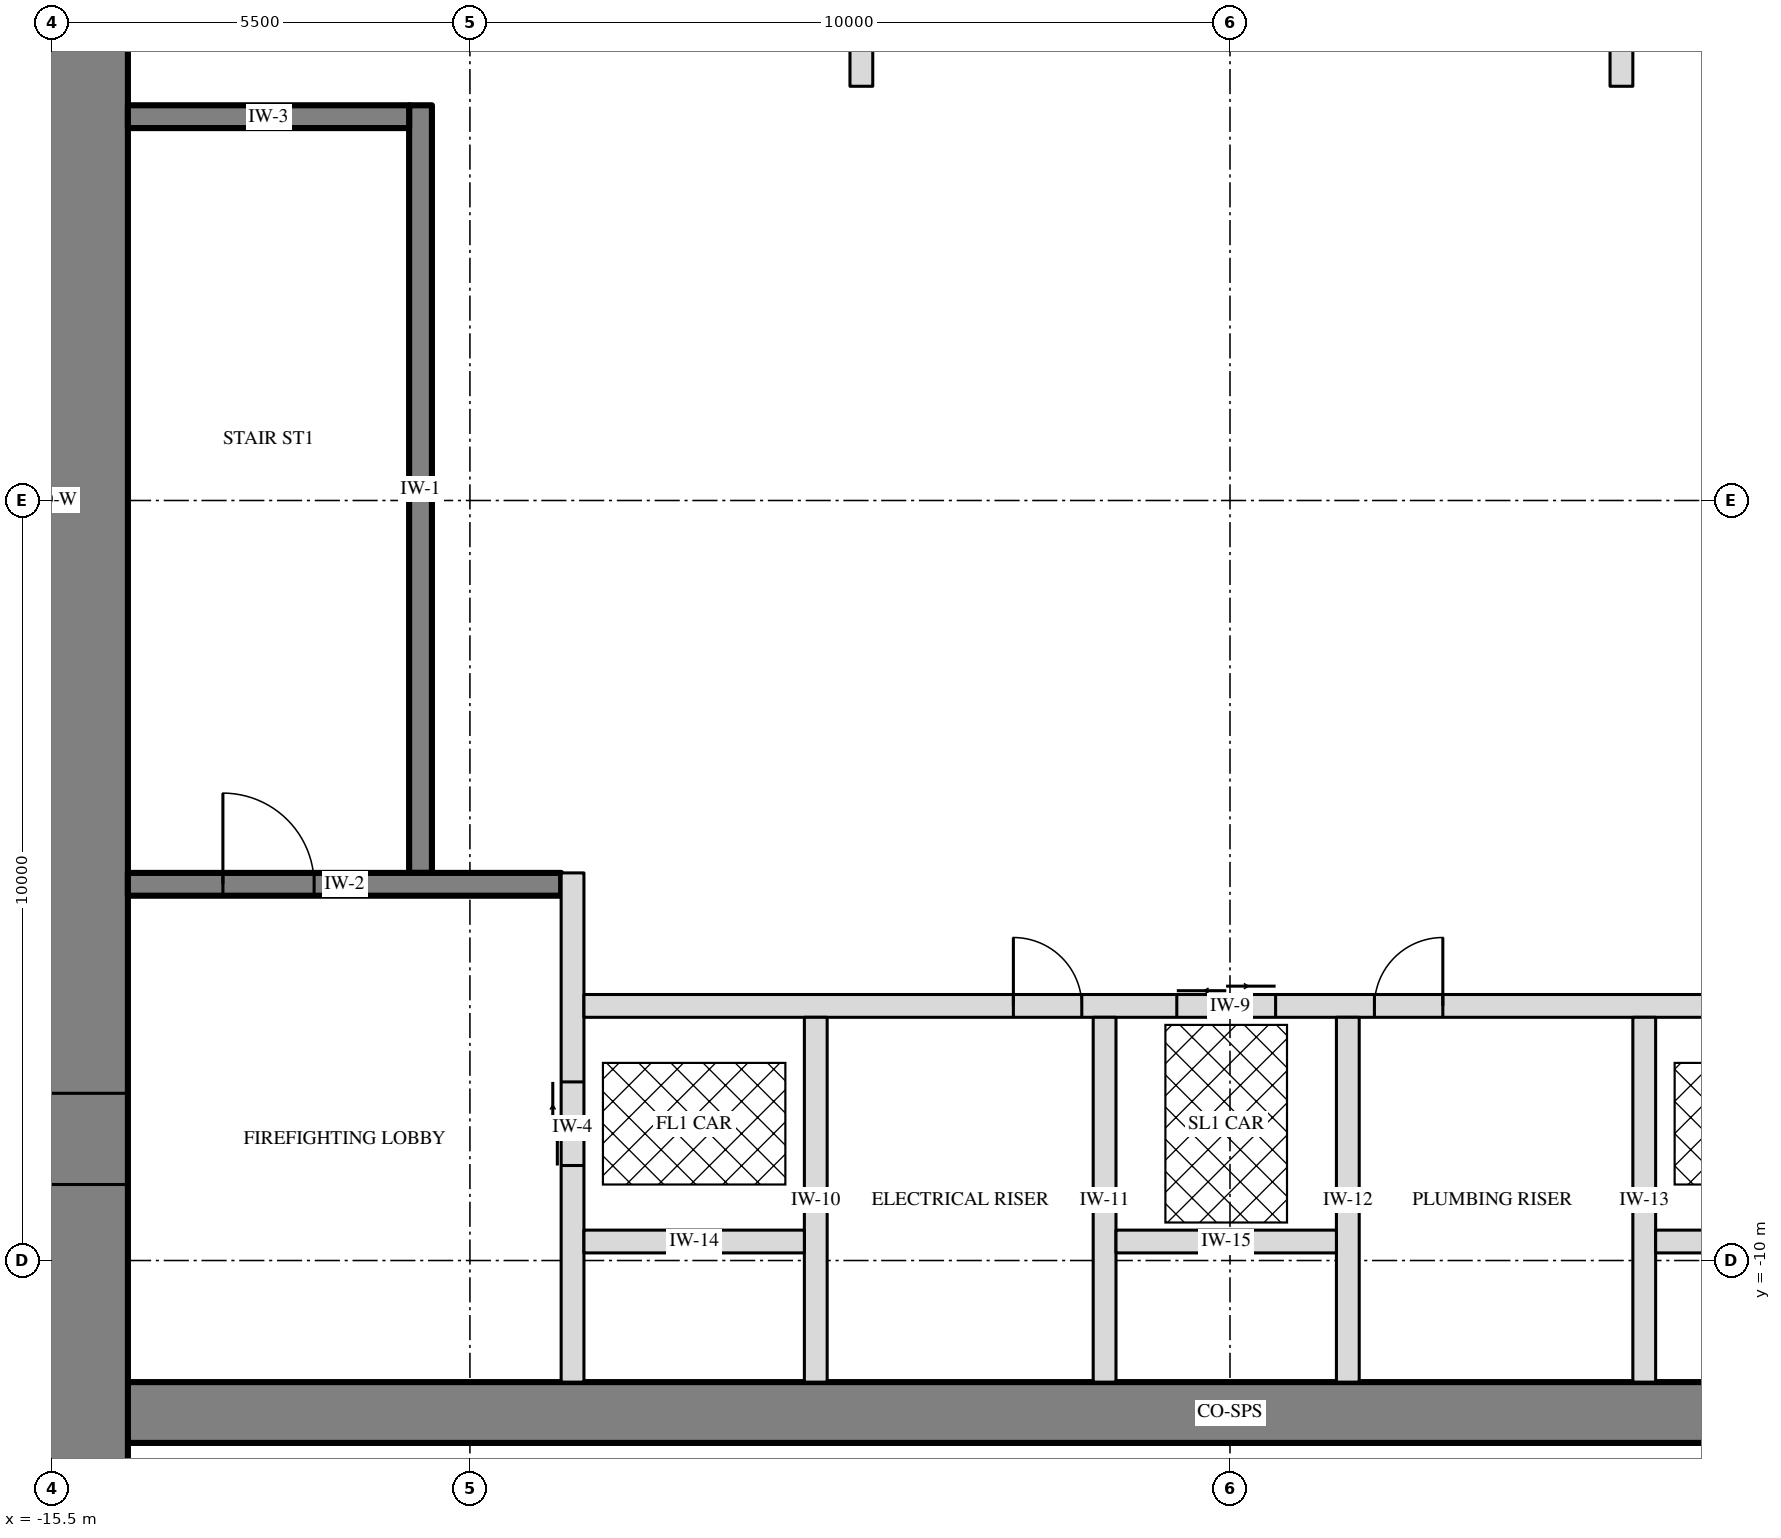
"""IFC4 building model, lengths in metres.
Left out: names, types, materials, properties, quantities, classifications, styles, units other than length and angle.
Written with IfcOpenShell. Run it as: python <this file> out.ifc"""

import sys

from ifc_helpers import new_model, si_unit, direction, frame, frame_2d, origin, origin_2d, place, context, subcontext, project, spatial, rectangle, extrude, element, fill, save


model = new_model("IFC4")
c1 = context("Model", 3, precision=1e-05, world=origin(), true_north=direction((0.0, 1.0)))
c2 = subcontext(c1, "Body", "Model", "MODEL_VIEW")
j1 = project(units=[si_unit("LENGTHUNIT", "METRE"), si_unit("PLANEANGLEUNIT", "RADIAN")], contexts=[c1])
p1 = place(None, origin())
s1 = spatial("IfcSite", under=j1, at=p1, CompositionType="ELEMENT")
p2 = place(p1, origin())
s2 = spatial("IfcBuilding", under=s1, at=p2, CompositionType="ELEMENT")
p3 = place(p2, frame((0.0, 0.0, -13.2)))
s3 = spatial("IfcBuildingStorey", under=s2, at=p3, CompositionType="ELEMENT", Elevation=-13.2)
p4 = place(p3, frame((-15.5, -12.0, -0.4), z_axis=(0.0, 0.0, 1.0), x_axis=(1.0, 0.0, 0.0)))
e1 = element("IfcWall", 1, at=p4, inside=s3, PredefinedType="SHEAR", context=c2, shape_type="SweptSolid", body=[
    extrude(rectangle(XDim=31.0, YDim=0.8, at=frame_2d((15.5, 0.0))), origin(), (0.0, 0.0, 1.0), 4.3),
])
p5 = place(p3, frame((-15.5, -15.5, -0.4), z_axis=(0.0, 0.0, 1.0), x_axis=(0.0, 1.0, 0.0)))
e2 = element("IfcWall", 2, at=p5, inside=s3, PredefinedType="SHEAR", context=c2, shape_type="SweptSolid", body=[
    extrude(rectangle(XDim=31.0, YDim=2.0, at=frame_2d((15.5, 0.0))), origin(), (0.0, 0.0, 1.0), 4.3),
])
p6 = place(p5, frame((6.5, 0.0, 0.4)))
e3 = element("IfcOpeningElement", 3, at=p6, cuts=e2, PredefinedType="OPENING", context=c2, shape_type="SweptSolid", body=[
    extrude(rectangle(XDim=1.2, YDim=2.1, at=frame_2d((0.6, 1.05))), frame((0.0, 1.01, 0.0), z_axis=(0.0, -1.0, 0.0), x_axis=(1.0, 0.0, 0.0)), (0.0, 0.0, 1.0), 2.02),
])
p7 = place(p5, frame((23.0, 0.0, 0.4)))
e4 = element("IfcOpeningElement", 4, at=p7, cuts=e2, PredefinedType="OPENING", context=c2, shape_type="SweptSolid", body=[
    extrude(rectangle(XDim=1.8, YDim=2.1, at=frame_2d((0.9, 1.05))), frame((0.0, 1.01, 0.0), z_axis=(0.0, -1.0, 0.0), x_axis=(1.0, 0.0, 0.0)), (0.0, 0.0, 1.0), 2.02),
])
p8 = place(p3, frame((-10.65, -4.9, 0.0), z_axis=(0.0, 0.0, 1.0), x_axis=(0.0, 1.0, 0.0)))
e5 = element("IfcWall", 5, at=p8, inside=s3, PredefinedType="SOLIDWALL", context=c2, shape_type="SweptSolid", body=[
    extrude(rectangle(XDim=10.1, YDim=0.3, at=frame_2d((5.05, 0.0))), origin(), (0.0, 0.0, 1.0), 3.9),
])
p9 = place(p3, frame((-14.5, -5.05, 0.0), z_axis=(0.0, 0.0, 1.0), x_axis=(1.0, 0.0, 0.0)))
e6 = element("IfcWall", 6, at=p9, inside=s3, PredefinedType="SOLIDWALL", context=c2, shape_type="SweptSolid", body=[
    extrude(rectangle(XDim=5.7, YDim=0.3, at=frame_2d((2.85, 0.0))), origin(), (0.0, 0.0, 1.0), 3.9),
])
p10 = place(p9, frame((1.25, 0.0, 0.0)))
e7 = element("IfcOpeningElement", 7, at=p10, cuts=e6, PredefinedType="OPENING", context=c2, shape_type="SweptSolid", body=[
    extrude(rectangle(XDim=1.2, YDim=2.1, at=frame_2d((0.6, 1.05))), frame((0.0, 0.16, 0.0), z_axis=(0.0, -1.0, 0.0), x_axis=(1.0, 0.0, 0.0)), (0.0, 0.0, 1.0), 0.32),
])
p11 = place(p3, frame((-14.5, 5.05, 0.0), z_axis=(0.0, 0.0, 1.0), x_axis=(1.0, 0.0, 0.0)))
e8 = element("IfcWall", 8, at=p11, inside=s3, PredefinedType="SOLIDWALL", context=c2, shape_type="SweptSolid", body=[
    extrude(rectangle(XDim=3.7, YDim=0.3, at=frame_2d((1.85, 0.0))), origin(), (0.0, 0.0, 1.0), 3.9),
])
p12 = place(p3, frame((-8.65, -11.6, 0.0), z_axis=(0.0, 0.0, 1.0), x_axis=(0.0, 1.0, 0.0)))
e9 = element("IfcWall", 9, at=p12, inside=s3, PredefinedType="PARTITIONING", context=c2, shape_type="SweptSolid", body=[
    extrude(rectangle(XDim=6.7, YDim=0.3, at=frame_2d((3.35, 0.0))), origin(), (0.0, 0.0, 1.0), 3.9),
])
p13 = place(p12, frame((2.85, 0.0, 0.0)))
e10 = element("IfcOpeningElement", 10, at=p13, cuts=e9, PredefinedType="OPENING", context=c2, shape_type="SweptSolid", body=[
    extrude(rectangle(XDim=1.1, YDim=2.1, at=frame_2d((0.55, 1.05))), frame((0.0, 0.16, 0.0), z_axis=(0.0, -1.0, 0.0), x_axis=(1.0, 0.0, 0.0)), (0.0, 0.0, 1.0), 0.32),
])
p14 = place(p3, frame((-8.5, -6.65, 0.0), z_axis=(0.0, 0.0, 1.0), x_axis=(1.0, 0.0, 0.0)))
e11 = element("IfcWall", 11, at=p14, inside=s3, PredefinedType="PARTITIONING", context=c2, shape_type="SweptSolid", body=[
    extrude(rectangle(XDim=17.0, YDim=0.3, at=frame_2d((8.5, 0.0))), origin(), (0.0, 0.0, 1.0), 3.9),
])
p15 = place(p14, frame((7.8, 0.0, 0.0)))
e12 = element("IfcOpeningElement", 12, at=p15, cuts=e11, PredefinedType="OPENING", context=c2, shape_type="SweptSolid", body=[
    extrude(rectangle(XDim=1.3, YDim=2.4, at=frame_2d((0.65, 1.2))), frame((0.0, 0.16, 0.0), z_axis=(0.0, -1.0, 0.0), x_axis=(1.0, 0.0, 0.0)), (0.0, 0.0, 1.0), 0.32),
])
p16 = place(p14, frame((5.65, 0.0, 0.0)))
e13 = element("IfcOpeningElement", 13, at=p16, cuts=e11, PredefinedType="OPENING", context=c2, shape_type="SweptSolid", body=[
    extrude(rectangle(XDim=0.9, YDim=2.1, at=frame_2d((0.45, 1.05))), frame((0.0, 0.16, 0.0), z_axis=(0.0, -1.0, 0.0), x_axis=(1.0, 0.0, 0.0)), (0.0, 0.0, 1.0), 0.32),
])
p17 = place(p14, frame((10.4, 0.0, 0.0)))
e14 = element("IfcOpeningElement", 14, at=p17, cuts=e11, PredefinedType="OPENING", context=c2, shape_type="SweptSolid", body=[
    extrude(rectangle(XDim=0.9, YDim=2.1, at=frame_2d((0.45, 1.05))), frame((0.0, 0.16, 0.0), z_axis=(0.0, -1.0, 0.0), x_axis=(1.0, 0.0, 0.0)), (0.0, 0.0, 1.0), 0.32),
])
for number, where, z_axis, x_axis in (
    (15, (-5.45, -11.6, 0.0), (0.0, 0.0, 1.0), (0.0, 1.0, 0.0)),
    (16, (-1.65, -11.6, 0.0), (0.0, 0.0, 1.0), (0.0, 1.0, 0.0)),
    (17, (1.55, -11.6, 0.0), (0.0, 0.0, 1.0), (0.0, 1.0, 0.0)),
    (18, (5.45, -11.6, 0.0), (0.0, 0.0, 1.0), (0.0, 1.0, 0.0)),
):
    element("IfcWall", number, at=place(p3, frame(where, z_axis=z_axis, x_axis=x_axis)), inside=s3, PredefinedType="PARTITIONING", context=c2, shape_type="SweptSolid", body=[
        extrude(rectangle(XDim=4.8, YDim=0.3, at=frame_2d((2.4, 0.0))), origin(), (0.0, 0.0, 1.0), 3.9),
    ])
for number, where, z_axis, x_axis in (
    (19, (-8.5, -9.75, 0.0), (0.0, 0.0, 1.0), (1.0, 0.0, 0.0)),
    (20, (-1.5, -9.75, 0.0), (0.0, 0.0, 1.0), (1.0, 0.0, 0.0)),
    (21, (5.6, -9.75, 0.0), (0.0, 0.0, 1.0), (1.0, 0.0, 0.0)),
):
    element("IfcWall", number, at=place(p3, frame(where, z_axis=z_axis, x_axis=x_axis)), inside=s3, PredefinedType="PARTITIONING", context=c2, shape_type="SweptSolid", body=[
        extrude(rectangle(XDim=2.9, YDim=0.3, at=frame_2d((1.45, 0.0))), origin(), (0.0, 0.0, 1.0), 3.9),
    ])
p18 = place(p3, frame((-10.65, 2.0, 0.0), z_axis=(0.0, 0.0, 1.0), x_axis=(1.0, 0.0, 0.0)))
e22 = element("IfcWall", 22, at=p18, inside=s3, PredefinedType="PARTITIONING", context=c2, shape_type="SweptSolid", body=[
    extrude(rectangle(XDim=21.3, YDim=0.3, at=frame_2d((10.65, 0.0))), origin(), (0.0, 0.0, 1.0), 3.9),
])
p19 = place(p18, frame((10.05, 0.0, 0.0)))
e23 = element("IfcOpeningElement", 23, at=p19, cuts=e22, PredefinedType="OPENING", context=c2, shape_type="SweptSolid", body=[
    extrude(rectangle(XDim=1.2, YDim=2.1, at=frame_2d((0.6, 1.05))), frame((0.0, 0.16, 0.0), z_axis=(0.0, -1.0, 0.0), x_axis=(1.0, 0.0, 0.0)), (0.0, 0.0, 1.0), 0.32),
])
p20 = place(p18, frame((18.942, 0.0, 0.0)))
e24 = element("IfcOpeningElement", 24, at=p20, cuts=e22, PredefinedType="OPENING", context=c2, shape_type="SweptSolid", body=[
    extrude(rectangle(XDim=0.9, YDim=2.1, at=frame_2d((0.45, 1.05))), frame((0.0, 0.16, 0.0), z_axis=(0.0, -1.0, 0.0), x_axis=(1.0, 0.0, 0.0)), (0.0, 0.0, 1.0), 0.32),
])
p21 = place(p3, frame((-3.3, -6.65, 0.0), z_axis=(0.0, 0.0, 1.0), x_axis=(0.0, 1.0, 0.0)))
e25 = element("IfcWall", 25, at=p21, inside=s3, PredefinedType="PARTITIONING", context=c2, shape_type="SweptSolid", body=[
    extrude(rectangle(XDim=8.65, YDim=0.3, at=frame_2d((4.325, 0.0))), origin(), (0.0, 0.0, 1.0), 3.9),
])
p22 = place(p21, frame((1.75, 0.0, 0.0)))
e26 = element("IfcOpeningElement", 26, at=p22, cuts=e25, PredefinedType="OPENING", context=c2, shape_type="SweptSolid", body=[
    extrude(rectangle(XDim=0.9, YDim=2.1, at=frame_2d((0.45, 1.05))), frame((0.0, 0.16, 0.0), z_axis=(0.0, -1.0, 0.0), x_axis=(1.0, 0.0, 0.0)), (0.0, 0.0, 1.0), 0.32),
])
p23 = place(p21, frame((6.075, 0.0, 0.0)))
e27 = element("IfcOpeningElement", 27, at=p23, cuts=e25, PredefinedType="OPENING", context=c2, shape_type="SweptSolid", body=[
    extrude(rectangle(XDim=0.9, YDim=2.1, at=frame_2d((0.45, 1.05))), frame((0.0, 0.16, 0.0), z_axis=(0.0, -1.0, 0.0), x_axis=(1.0, 0.0, 0.0)), (0.0, 0.0, 1.0), 0.32),
])
p24 = place(p3, frame((3.3, -6.65, 0.0), z_axis=(0.0, 0.0, 1.0), x_axis=(0.0, 1.0, 0.0)))
e28 = element("IfcWall", 28, at=p24, inside=s3, PredefinedType="PARTITIONING", context=c2, shape_type="SweptSolid", body=[
    extrude(rectangle(XDim=8.65, YDim=0.3, at=frame_2d((4.325, 0.0))), origin(), (0.0, 0.0, 1.0), 3.9),
])
p25 = place(p24, frame((3.875, 0.0, 0.0)))
e29 = element("IfcOpeningElement", 29, at=p25, cuts=e28, PredefinedType="OPENING", context=c2, shape_type="SweptSolid", body=[
    extrude(rectangle(XDim=0.9, YDim=2.1, at=frame_2d((0.45, 1.05))), frame((0.0, 0.16, 0.0), z_axis=(0.0, -1.0, 0.0), x_axis=(1.0, 0.0, 0.0)), (0.0, 0.0, 1.0), 0.32),
])
p26 = place(p3, frame((-10.65, -2.25, 0.0), z_axis=(0.0, 0.0, 1.0), x_axis=(1.0, 0.0, 0.0)))
e30 = element("IfcWall", 30, at=p26, inside=s3, PredefinedType="PARTITIONING", context=c2, shape_type="SweptSolid", body=[
    extrude(rectangle(XDim=7.35, YDim=0.3, at=frame_2d((3.675, 0.0))), origin(), (0.0, 0.0, 1.0), 3.9),
])
p27 = place(p3, frame((-4.85, 5.45, 0.0), z_axis=(0.0, 0.0, 1.0), x_axis=(1.0, 0.0, 0.0)))
e31 = element("IfcWall", 31, at=p27, inside=s3, PredefinedType="PARTITIONING", context=c2, shape_type="SweptSolid", body=[
    extrude(rectangle(XDim=10.0, YDim=0.3, at=frame_2d((5.0, 0.0))), origin(), (0.0, 0.0, 1.0), 3.9),
])
p28 = place(p3, frame((-4.85, 5.45, 0.0), z_axis=(0.0, 0.0, 1.0), x_axis=(0.0, 1.0, 0.0)))
e32 = element("IfcWall", 32, at=p28, inside=s3, PredefinedType="PARTITIONING", context=c2, shape_type="SweptSolid", body=[
    extrude(rectangle(XDim=6.15, YDim=0.3, at=frame_2d((3.075, 0.0))), origin(), (0.0, 0.0, 1.0), 3.9),
])
p29 = place(p3, frame((5.15, 5.45, 0.0), z_axis=(0.0, 0.0, 1.0), x_axis=(0.0, 1.0, 0.0)))
e33 = element("IfcWall", 33, at=p29, inside=s3, PredefinedType="PARTITIONING", context=c2, shape_type="SweptSolid", body=[
    extrude(rectangle(XDim=6.15, YDim=0.3, at=frame_2d((3.075, 0.0))), origin(), (0.0, 0.0, 1.0), 3.9),
])
p30 = place(p29, frame((1.1, 0.0, 0.0)))
e34 = element("IfcOpeningElement", 34, at=p30, cuts=e33, PredefinedType="OPENING", context=c2, shape_type="SweptSolid", body=[
    extrude(rectangle(XDim=0.9, YDim=2.1, at=frame_2d((0.45, 1.05))), frame((0.0, 0.16, 0.0), z_axis=(0.0, -1.0, 0.0), x_axis=(1.0, 0.0, 0.0)), (0.0, 0.0, 1.0), 0.32),
])
for number, where, z_axis, x_axis in (
    (35, (-8.5, -9.55, -1.8), (0.0, 0.0, 1.0), (1.0, 0.0, 0.0)),
    (36, (-5.6, -6.85, -1.8), (0.0, 0.0, 1.0), (-1.0, 0.0, 0.0)),
):
    element("IfcWall", number, at=place(p3, frame(where, z_axis=z_axis, x_axis=x_axis)), inside=s3, PredefinedType="SOLIDWALL", context=c2, shape_type="SweptSolid", body=[
        extrude(rectangle(XDim=2.9, YDim=0.1, at=frame_2d((1.45, 0.0))), origin(), (0.0, 0.0, 1.0), 1.8),
    ])
for number, where, z_axis, x_axis in (
    (37, (-8.45, -6.9, -1.8), (0.0, 0.0, 1.0), (0.0, -1.0, 0.0)),
    (38, (-5.65, -9.5, -1.8), (0.0, 0.0, 1.0), (0.0, 1.0, 0.0)),
):
    element("IfcWall", number, at=place(p3, frame(where, z_axis=z_axis, x_axis=x_axis)), inside=s3, PredefinedType="SOLIDWALL", context=c2, shape_type="SweptSolid", body=[
        extrude(rectangle(XDim=2.6, YDim=0.1, at=frame_2d((1.3, 0.0))), origin(), (0.0, 0.0, 1.0), 1.8),
    ])
for number, where, z_axis, x_axis in (
    (39, (5.6, -9.55, -1.8), (0.0, 0.0, 1.0), (1.0, 0.0, 0.0)),
    (40, (8.5, -6.85, -1.8), (0.0, 0.0, 1.0), (-1.0, 0.0, 0.0)),
):
    element("IfcWall", number, at=place(p3, frame(where, z_axis=z_axis, x_axis=x_axis)), inside=s3, PredefinedType="SOLIDWALL", context=c2, shape_type="SweptSolid", body=[
        extrude(rectangle(XDim=2.9, YDim=0.1, at=frame_2d((1.45, 0.0))), origin(), (0.0, 0.0, 1.0), 1.8),
    ])
p31 = place(p3, frame((5.65, -6.9, -1.8), z_axis=(0.0, 0.0, 1.0), x_axis=(0.0, -1.0, 0.0)))
e41 = element("IfcWall", 41, at=p31, inside=s3, PredefinedType="SOLIDWALL", context=c2, shape_type="SweptSolid", body=[
    extrude(rectangle(XDim=2.6, YDim=0.1, at=frame_2d((1.3, 0.0))), origin(), (0.0, 0.0, 1.0), 1.8),
])
for number, where, z_axis, x_axis in (
    (42, (-4.55, 5.45, 0.0), (0.0, 0.0, 1.0), (1.0, 0.0, 0.0)),
    (43, (4.85, 5.45, 0.0), (0.0, 0.0, 1.0), (1.0, 0.0, 0.0)),
):
    element("IfcColumn", number, at=place(p3, frame(where, z_axis=z_axis, x_axis=x_axis)), inside=s3, PredefinedType="COLUMN", context=c2, shape_type="SweptSolid", body=[
        extrude(rectangle(XDim=0.4, YDim=0.4, at=origin_2d()), origin(), (0.0, 0.0, 1.0), 3.9),
    ])
for number, where, z_axis, x_axis in (
    (44, (-1.5, -9.55, -1.8), (0.0, 0.0, 1.0), (1.0, 0.0, 0.0)),
    (45, (1.4, -6.85, -1.8), (0.0, 0.0, 1.0), (-1.0, 0.0, 0.0)),
):
    element("IfcWall", number, at=place(p3, frame(where, z_axis=z_axis, x_axis=x_axis)), inside=s3, PredefinedType="SOLIDWALL", context=c2, shape_type="SweptSolid", body=[
        extrude(rectangle(XDim=2.9, YDim=0.1, at=frame_2d((1.45, 0.0))), origin(), (0.0, 0.0, 1.0), 1.8),
    ])
for number, where, z_axis, x_axis in (
    (46, (-1.45, -6.9, -1.8), (0.0, 0.0, 1.0), (0.0, -1.0, 0.0)),
    (47, (1.35, -9.5, -1.8), (0.0, 0.0, 1.0), (0.0, 1.0, 0.0)),
):
    element("IfcWall", number, at=place(p3, frame(where, z_axis=z_axis, x_axis=x_axis)), inside=s3, PredefinedType="SOLIDWALL", context=c2, shape_type="SweptSolid", body=[
        extrude(rectangle(XDim=2.6, YDim=0.1, at=frame_2d((1.3, 0.0))), origin(), (0.0, 0.0, 1.0), 1.8),
    ])
p32 = place(p10, origin())
e48 = element("IfcDoor", 48, at=p32, inside=s3, OperationType="SINGLE_SWING_LEFT", PredefinedType="DOOR", context=c2, shape_type="SweptSolid", body=[
    extrude(rectangle(XDim=1.2, YDim=2.1, at=frame_2d((0.6, 1.05))), frame((0.0, 0.025, 0.0), z_axis=(0.0, -1.0, 0.0), x_axis=(1.0, 0.0, 0.0)), (0.0, 0.0, 1.0), 0.05),
])
fill(e7, e48)
p33 = place(p6, origin())
e49 = element("IfcDoor", 49, at=p33, inside=s3, OperationType="SINGLE_SWING_LEFT", PredefinedType="DOOR", context=c2, shape_type="SweptSolid", body=[
    extrude(rectangle(XDim=1.2, YDim=2.1, at=frame_2d((0.6, 1.05))), frame((0.0, 0.025, 0.0), z_axis=(0.0, -1.0, 0.0), x_axis=(1.0, 0.0, 0.0)), (0.0, 0.0, 1.0), 0.05),
])
fill(e3, e49)
p34 = place(p13, origin())
e50 = element("IfcDoor", 50, at=p34, inside=s3, OperationType="DOUBLE_DOOR_SLIDING", PredefinedType="DOOR", context=c2, shape_type="SweptSolid", body=[
    extrude(rectangle(XDim=1.1, YDim=2.1, at=frame_2d((0.55, 1.05))), frame((0.0, 0.025, 0.0), z_axis=(0.0, -1.0, 0.0), x_axis=(1.0, 0.0, 0.0)), (0.0, 0.0, 1.0), 0.05),
])
fill(e10, e50)
p35 = place(p15, origin())
e51 = element("IfcDoor", 51, at=p35, inside=s3, OperationType="DOUBLE_DOOR_SLIDING", PredefinedType="DOOR", context=c2, shape_type="SweptSolid", body=[
    extrude(rectangle(XDim=1.3, YDim=2.4, at=frame_2d((0.65, 1.2))), frame((0.0, 0.025, 0.0), z_axis=(0.0, -1.0, 0.0), x_axis=(1.0, 0.0, 0.0)), (0.0, 0.0, 1.0), 0.05),
])
fill(e12, e51)
p36 = place(p19, origin())
e52 = element("IfcDoor", 52, at=p36, inside=s3, OperationType="SINGLE_SWING_LEFT", PredefinedType="DOOR", context=c2, shape_type="SweptSolid", body=[
    extrude(rectangle(XDim=1.2, YDim=2.1, at=frame_2d((0.6, 1.05))), frame((0.0, 0.025, 0.0), z_axis=(0.0, -1.0, 0.0), x_axis=(1.0, 0.0, 0.0)), (0.0, 0.0, 1.0), 0.05),
])
fill(e23, e52)
p37 = place(p16, origin())
e53 = element("IfcDoor", 53, at=p37, inside=s3, OperationType="SINGLE_SWING_LEFT", PredefinedType="DOOR", context=c2, shape_type="SweptSolid", body=[
    extrude(rectangle(XDim=0.9, YDim=2.1, at=frame_2d((0.45, 1.05))), frame((0.0, 0.025, 0.0), z_axis=(0.0, -1.0, 0.0), x_axis=(1.0, 0.0, 0.0)), (0.0, 0.0, 1.0), 0.05),
])
fill(e13, e53)
p38 = place(p17, origin())
e54 = element("IfcDoor", 54, at=p38, inside=s3, OperationType="SINGLE_SWING_RIGHT", PredefinedType="DOOR", context=c2, shape_type="SweptSolid", body=[
    extrude(rectangle(XDim=0.9, YDim=2.1, at=frame_2d((0.45, 1.05))), frame((0.0, 0.025, 0.0), z_axis=(0.0, -1.0, 0.0), x_axis=(1.0, 0.0, 0.0)), (0.0, 0.0, 1.0), 0.05),
])
fill(e14, e54)
p39 = place(p22, origin())
e55 = element("IfcDoor", 55, at=p39, inside=s3, OperationType="SINGLE_SWING_LEFT", PredefinedType="DOOR", context=c2, shape_type="SweptSolid", body=[
    extrude(rectangle(XDim=0.9, YDim=2.1, at=frame_2d((0.45, 1.05))), frame((0.0, 0.025, 0.0), z_axis=(0.0, -1.0, 0.0), x_axis=(1.0, 0.0, 0.0)), (0.0, 0.0, 1.0), 0.05),
])
fill(e26, e55)
p40 = place(p23, origin())
e56 = element("IfcDoor", 56, at=p40, inside=s3, OperationType="SINGLE_SWING_LEFT", PredefinedType="DOOR", context=c2, shape_type="SweptSolid", body=[
    extrude(rectangle(XDim=0.9, YDim=2.1, at=frame_2d((0.45, 1.05))), frame((0.0, 0.025, 0.0), z_axis=(0.0, -1.0, 0.0), x_axis=(1.0, 0.0, 0.0)), (0.0, 0.0, 1.0), 0.05),
])
fill(e27, e56)
p41 = place(p25, origin())
e57 = element("IfcDoor", 57, at=p41, inside=s3, OperationType="SINGLE_SWING_LEFT", PredefinedType="DOOR", context=c2, shape_type="SweptSolid", body=[
    extrude(rectangle(XDim=0.9, YDim=2.1, at=frame_2d((0.45, 1.05))), frame((0.0, 0.025, 0.0), z_axis=(0.0, -1.0, 0.0), x_axis=(1.0, 0.0, 0.0)), (0.0, 0.0, 1.0), 0.05),
])
fill(e29, e57)
save(model, sys.argv[1])
